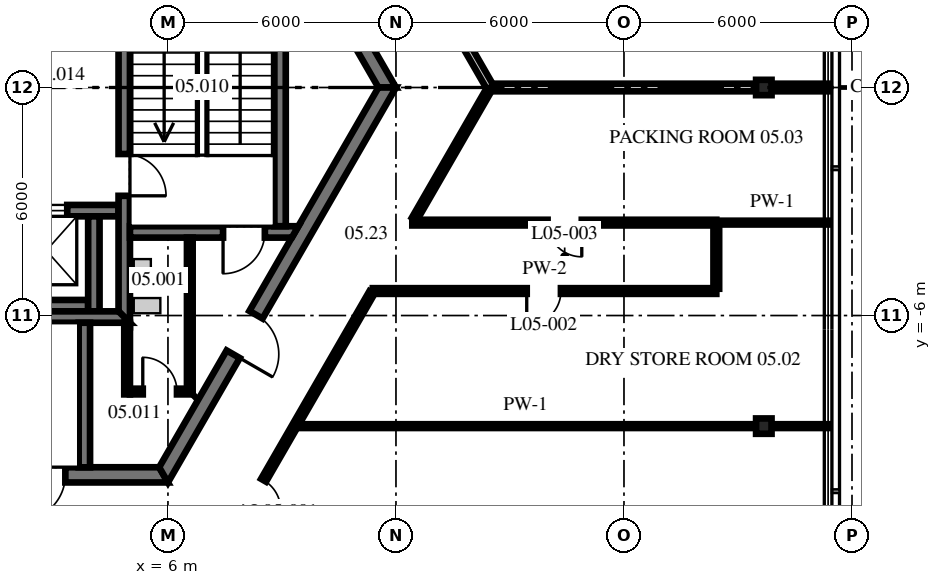
"""IFC4 building model, lengths in metres.
Left out: names, types, materials, properties, quantities, classifications, styles, units other than length and angle.
Written with IfcOpenShell. Run it as: python <this file> out.ifc"""

import sys

from ifc_helpers import new_model, si_unit, direction, frame, frame_2d, origin, origin_2d, place, context, subcontext, project, spatial, polyline, rectangle, i_section, outline, extrude, source, transform, mapped, element, fill, save


model = new_model("IFC4")
c1 = context("Model", 3, precision=1e-05, world=origin(), true_north=direction((0.0, 1.0)))
c2 = subcontext(c1, "Body", "Model", "MODEL_VIEW")
j1 = project(units=[si_unit("LENGTHUNIT", "METRE"), si_unit("PLANEANGLEUNIT", "RADIAN")], contexts=[c1])
p1 = place(None, origin())
s1 = spatial("IfcSite", under=j1, at=p1, CompositionType="ELEMENT")
p2 = place(p1, origin())
s2 = spatial("IfcBuilding", under=s1, at=p2, CompositionType="ELEMENT")
p3 = place(p2, frame((0.0, 0.0, 24.6)))
s3 = spatial("IfcBuildingStorey", under=s2, at=p3, CompositionType="ELEMENT", Elevation=24.6)
m1 = source(origin(), c2, "Body", "SweptSolid", [
    extrude(i_section(OverallWidth=0.404, OverallDepth=0.406, WebThickness=0.027, FlangeThickness=0.044, at=origin_2d()), origin(), (0.0, 0.0, 1.0), 4.3),
])
for number, where, z_axis, x_axis in (
    (1, (21.679, -8.91, 0.0), (0.0, 0.0, 1.0), (0.0, 1.0, 0.0)),
    (2, (21.679, 0.0, 0.0), (0.0, 0.0, 1.0), (0.0, 1.0, 0.0)),
):
    element("IfcColumn", number, at=place(p3, frame(where, z_axis=z_axis, x_axis=x_axis)), inside=s3, PredefinedType="COLUMN", context=c2, shape_type="MappedRepresentation", body=[
        mapped(m1, transform((0.0, 0.0, 0.0), scale=1.0)),
    ])
m2 = source(origin(), c2, "Body", "SweptSolid", [
    extrude(outline(polyline([(-0.115, -0.2), (11.885, -0.2), (11.654, 0.2), (0.115, 0.2), (-0.115, -0.2)])), origin(), (0.0, 0.0, 1.0), 4.1),
])
p4 = place(p3, frame((11.769, 0.0, 0.0), z_axis=(0.0, 0.0, 1.0), x_axis=(-0.499996592174, 0.866027371285, 0.0)))
e3 = element("IfcWall", 3, at=p4, inside=s3, PredefinedType="SHEAR", context=c2, shape_type="MappedRepresentation", body=[
    mapped(m2, transform((0.0, 0.0, 0.0), scale=1.0)),
])
p5 = place(p4, frame((5.75, 0.0, 0.0)))
e4 = element("IfcOpeningElement", 4, at=p5, cuts=e3, PredefinedType="OPENING", context=c2, shape_type="SweptSolid", body=[
    extrude(rectangle(XDim=1.2, YDim=2.1, at=frame_2d((0.6, 1.05))), frame((0.0, 0.21, 0.0), z_axis=(0.0, -1.0, 0.0), x_axis=(1.0, 0.0, 0.0)), (0.0, 0.0, 1.0), 0.42),
])
p6 = place(p3, frame((-5.885, -10.192, 0.0), z_axis=(0.0, 0.0, 1.0), x_axis=(1.0, 0.0, 0.0)))
e5 = element("IfcWall", 5, at=p6, inside=s3, PredefinedType="SHEAR", context=c2, shape_type="MappedRepresentation", body=[
    mapped(m2, transform((0.0, 0.0, 0.0), scale=1.0)),
])
p7 = place(p6, frame((7.985, 0.0, 0.0)))
e6 = element("IfcOpeningElement", 6, at=p7, cuts=e5, PredefinedType="OPENING", context=c2, shape_type="SweptSolid", body=[
    extrude(rectangle(XDim=1.2, YDim=2.1, at=frame_2d((0.6, 1.05))), frame((0.0, 0.21, 0.0), z_axis=(0.0, -1.0, 0.0), x_axis=(1.0, 0.0, 0.0)), (0.0, 0.0, 1.0), 0.42),
])
p8 = place(p6, frame((0.534, 0.0, 0.0)))
e7 = element("IfcOpeningElement", 7, at=p8, cuts=e5, PredefinedType="OPENING", context=c2, shape_type="SweptSolid", body=[
    extrude(rectangle(XDim=0.9, YDim=2.1, at=frame_2d((0.45, 1.05))), frame((0.0, 0.21, 0.0), z_axis=(0.0, -1.0, 0.0), x_axis=(1.0, 0.0, 0.0)), (0.0, 0.0, 1.0), 0.42),
])
p9 = place(p3, frame((5.885, -10.192, 0.0), z_axis=(0.0, 0.0, 1.0), x_axis=(0.499996592174, 0.866027371285, 0.0)))
e8 = element("IfcWall", 8, at=p9, inside=s3, PredefinedType="SHEAR", context=c2, shape_type="MappedRepresentation", body=[
    mapped(m2, transform((0.0, 0.0, 0.0), scale=1.0)),
])
p10 = place(p9, frame((3.665, 0.0, 0.0)))
e9 = element("IfcOpeningElement", 9, at=p10, cuts=e8, PredefinedType="OPENING", context=c2, shape_type="SweptSolid", body=[
    extrude(rectangle(XDim=1.2, YDim=2.1, at=frame_2d((0.6, 1.05))), frame((0.0, 0.21, 0.0), z_axis=(0.0, -1.0, 0.0), x_axis=(1.0, 0.0, 0.0)), (0.0, 0.0, 1.0), 0.42),
])
m3 = source(origin(), c2, "Body", "SweptSolid", [
    extrude(rectangle(XDim=12.8, YDim=0.3, at=frame_2d((6.4, 0.0))), origin(), (0.0, 0.0, 1.0), 4.1),
])
p11 = place(p3, frame((-8.1, -3.24, 0.0), z_axis=(0.0, 0.0, 1.0), x_axis=(1.0, 0.0, 0.0)))
e10 = element("IfcWall", 10, at=p11, inside=s3, PredefinedType="SHEAR", context=c2, shape_type="MappedRepresentation", body=[
    mapped(m3, transform((0.0, 0.0, 0.0), scale=1.0)),
])
p12 = place(p11, frame((2.212, 0.0, 0.0)))
e11 = element("IfcOpeningElement", 11, at=p12, cuts=e10, PredefinedType="OPENING", context=c2, shape_type="SweptSolid", body=[
    extrude(rectangle(XDim=0.9, YDim=2.1, at=frame_2d((0.45, 1.05))), frame((0.0, 0.16, 0.0), z_axis=(0.0, -1.0, 0.0), x_axis=(1.0, 0.0, 0.0)), (0.0, 0.0, 1.0), 0.32),
])
p13 = place(p11, frame((5.65, 0.0, 0.0)))
e12 = element("IfcOpeningElement", 12, at=p13, cuts=e10, PredefinedType="OPENING", context=c2, shape_type="SweptSolid", body=[
    extrude(rectangle(XDim=0.9, YDim=2.1, at=frame_2d((0.45, 1.05))), frame((0.0, 0.16, 0.0), z_axis=(0.0, -1.0, 0.0), x_axis=(1.0, 0.0, 0.0)), (0.0, 0.0, 1.0), 0.32),
])
p14 = place(p11, frame((7.887, 0.0, 0.0)))
e13 = element("IfcOpeningElement", 13, at=p14, cuts=e10, PredefinedType="OPENING", context=c2, shape_type="SweptSolid", body=[
    extrude(rectangle(XDim=0.9, YDim=2.1, at=frame_2d((0.45, 1.05))), frame((0.0, 0.16, 0.0), z_axis=(0.0, -1.0, 0.0), x_axis=(1.0, 0.0, 0.0)), (0.0, 0.0, 1.0), 0.32),
])
p15 = place(p11, frame((10.35, 0.0, 0.0)))
e14 = element("IfcOpeningElement", 14, at=p15, cuts=e10, PredefinedType="OPENING", context=c2, shape_type="SweptSolid", body=[
    extrude(rectangle(XDim=1.1, YDim=2.1, at=frame_2d((0.55, 1.05))), frame((0.0, 0.16, 0.0), z_axis=(0.0, -1.0, 0.0), x_axis=(1.0, 0.0, 0.0)), (0.0, 0.0, 1.0), 0.32),
])
m4 = source(origin(), c2, "Body", "SweptSolid", [
    extrude(outline(polyline([(12.0, -0.15), (-0.04, -0.15), (-0.213, 0.15), (12.0, 0.15), (12.0, -0.15)])), origin(), (0.0, 0.0, 1.0), 4.1),
])
p16 = place(p3, frame((-8.1, -5.74, 0.0), z_axis=(0.0, 0.0, 1.0), x_axis=(1.0, 0.0, 0.0)))
e15 = element("IfcWall", 15, at=p16, inside=s3, PredefinedType="SHEAR", context=c2, shape_type="MappedRepresentation", body=[
    mapped(m4, transform((0.0, 0.0, 0.0), scale=1.0)),
])
m5 = source(origin(), c2, "Body", "SweptSolid", [
    extrude(rectangle(XDim=2.5, YDim=0.3, at=frame_2d((1.25, 0.0))), origin(), (0.0, 0.0, 1.0), 4.1),
])
p17 = place(p3, frame((4.05, -5.89, 0.0), z_axis=(0.0, 0.0, 1.0), x_axis=(0.0, 1.0, 0.0)))
e16 = element("IfcWall", 16, at=p17, inside=s3, PredefinedType="SHEAR", context=c2, shape_type="MappedRepresentation", body=[
    mapped(m5, transform((0.0, 0.0, 0.0), scale=1.0)),
])
m6 = source(origin(), c2, "Body", "SweptSolid", [
    extrude(outline(polyline([(-0.15, -0.15), (9.99, -0.15), (9.99, 0.15), (0.15, 0.15), (-0.15, -0.15)])), origin(), (0.0, 0.0, 1.0), 4.1),
])
p18 = place(p3, frame((4.85, -6.04, 0.0), z_axis=(0.0, 0.0, 1.0), x_axis=(0.0, 1.0, 0.0)))
e17 = element("IfcWall", 17, at=p18, inside=s3, PredefinedType="SHEAR", context=c2, shape_type="MappedRepresentation", body=[
    mapped(m6, transform((0.0, 0.0, 0.0), scale=1.0)),
])
p19 = place(p18, frame((3.19, 0.0, 0.0)))
e18 = element("IfcOpeningElement", 18, at=p19, cuts=e17, PredefinedType="OPENING", context=c2, shape_type="SweptSolid", body=[
    extrude(rectangle(XDim=1.1, YDim=2.1, at=frame_2d((0.55, 1.05))), frame((0.0, 0.16, 0.0), z_axis=(0.0, -1.0, 0.0), x_axis=(1.0, 0.0, 0.0)), (0.0, 0.0, 1.0), 0.32),
])
m7 = source(origin(), c2, "Body", "SweptSolid", [
    extrude(outline(polyline([(0.0, -0.15), (0.0, 0.15), (4.433, 0.15), (4.26, -0.15), (0.0, -0.15)])), origin(), (0.0, 0.0, 1.0), 4.1),
])
p20 = place(p3, frame((5.0, -3.8, 0.0), z_axis=(0.0, 0.0, 1.0), x_axis=(1.0, 0.0, 0.0)))
e19 = element("IfcWall", 19, at=p20, inside=s3, PredefinedType="SHEAR", context=c2, shape_type="MappedRepresentation", body=[
    mapped(m7, transform((0.0, 0.0, 0.0), scale=1.0)),
])
p21 = place(p20, frame((2.45, 0.0, 0.0)))
e20 = element("IfcOpeningElement", 20, at=p21, cuts=e19, PredefinedType="OPENING", context=c2, shape_type="SweptSolid", body=[
    extrude(rectangle(XDim=1.1, YDim=2.1, at=frame_2d((0.55, 1.05))), frame((0.0, 0.16, 0.0), z_axis=(0.0, -1.0, 0.0), x_axis=(1.0, 0.0, 0.0)), (0.0, 0.0, 1.0), 0.32),
])
m8 = source(origin(), c2, "Body", "SweptSolid", [
    extrude(rectangle(XDim=7.3, YDim=0.3, at=frame_2d((3.65, 0.0))), origin(), (0.0, 0.0, 1.0), 4.1),
])
p22 = place(p3, frame((8.95, -3.65, 0.0), z_axis=(0.0, 0.0, 1.0), x_axis=(0.0, 1.0, 0.0)))
e21 = element("IfcWall", 21, at=p22, inside=s3, PredefinedType="SHEAR", context=c2, shape_type="MappedRepresentation", body=[
    mapped(m8, transform((0.0, 0.0, 0.0), scale=1.0)),
])
m9 = source(origin(), c2, "Body", "SweptSolid", [
    extrude(outline(polyline([(0.0, -0.15), (8.95, -0.15), (8.65, 0.15), (0.0, 0.15), (0.0, -0.15)])), origin(), (0.0, 0.0, 1.0), 4.1),
])
p23 = place(p3, frame((-3.95, -6.04, 0.0), z_axis=(0.0, 0.0, 1.0), x_axis=(1.0, 0.0, 0.0)))
e22 = element("IfcWall", 22, at=p23, inside=s3, PredefinedType="SHEAR", context=c2, shape_type="MappedRepresentation", body=[
    mapped(m9, transform((0.0, 0.0, 0.0), scale=1.0)),
])
m10 = source(origin(), c2, "Body", "SweptSolid", [
    extrude(outline(polyline([(3.8, -0.15), (-0.004, -0.15), (-0.004, 0.15), (3.8, 0.15), (3.8, -0.15)])), origin(), (0.0, 0.0, 1.0), 4.1),
])
p24 = place(p3, frame((3.8, -9.99, 0.0), z_axis=(0.0, 0.0, 1.0), x_axis=(0.0, 1.0, 0.0)))
e23 = element("IfcWall", 23, at=p24, inside=s3, PredefinedType="SHEAR", context=c2, shape_type="MappedRepresentation", body=[
    mapped(m10, transform((0.0, 0.0, 0.0), scale=1.0)),
])
m11 = source(origin(), c2, "Body", "SweptSolid", [
    extrude(outline(polyline([(0.0, -0.075), (1.65, -0.075), (1.5, 0.075), (0.0, 0.075), (0.0, -0.075)])), origin(), (0.0, 0.0, 1.0), 4.1),
])
p25 = place(p3, frame((5.0, -8.0, 0.0), z_axis=(0.0, 0.0, 1.0), x_axis=(1.0, 0.0, 0.0)))
e24 = element("IfcWall", 24, at=p25, inside=s3, PredefinedType="PARTITIONING", context=c2, shape_type="MappedRepresentation", body=[
    mapped(m11, transform((0.0, 0.0, 0.0), scale=1.0)),
])
p26 = place(p25, frame((0.337, 0.0, 0.0)))
e25 = element("IfcOpeningElement", 25, at=p26, cuts=e24, PredefinedType="OPENING", context=c2, shape_type="SweptSolid", body=[
    extrude(rectangle(XDim=0.9, YDim=2.1, at=frame_2d((0.45, 1.05))), frame((0.0, 0.085, 0.0), z_axis=(0.0, -1.0, 0.0), x_axis=(1.0, 0.0, 0.0)), (0.0, 0.0, 1.0), 0.17),
])
m12 = source(origin(), c2, "Body", "SweptSolid", [
    extrude(outline(polyline([(-0.075, -0.075), (4.05, -0.075), (4.05, 0.075), (0.075, 0.075), (-0.075, -0.075)])), origin(), (0.0, 0.0, 1.0), 4.1),
])
p27 = place(p3, frame((6.575, -8.0, 0.0), z_axis=(0.0, 0.0, 1.0), x_axis=(0.0, 1.0, 0.0)))
e26 = element("IfcWall", 26, at=p27, inside=s3, PredefinedType="PARTITIONING", context=c2, shape_type="MappedRepresentation", body=[
    mapped(m12, transform((0.0, 0.0, 0.0), scale=1.0)),
])
m13 = source(origin(), c2, "Body", "SweptSolid", [
    extrude(rectangle(XDim=1.885, YDim=0.15, at=frame_2d((0.942, 0.0))), origin(), (0.0, 0.0, 1.0), 4.1),
])
p28 = place(p3, frame((4.925, -8.075, 0.0), z_axis=(0.0, 0.0, 1.0), x_axis=(0.0, 1.0, 0.0)))
e27 = element("IfcWall", 27, at=p28, inside=s3, PredefinedType="PARTITIONING", context=c2, shape_type="MappedRepresentation", body=[
    mapped(m13, transform((0.0, 0.0, 0.0), scale=1.0)),
])
m14 = source(origin(), c2, "Body", "SweptSolid", [
    extrude(rectangle(XDim=8.229, YDim=0.2, at=frame_2d((4.115, 0.0))), origin(), (0.0, 0.0, 1.0), 4.1),
])
p29 = place(p3, frame((10.368, 7.127, 0.0), z_axis=(0.0, 0.0, 1.0), x_axis=(0.500012644715, -0.866018103232, 0.0)))
e28 = element("IfcWall", 28, at=p29, inside=s3, PredefinedType="PARTITIONING", context=c2, shape_type="MappedRepresentation", body=[
    mapped(m14, transform((0.0, 0.0, 0.0), scale=1.0)),
])
m15 = source(origin(), c2, "Body", "SweptSolid", [
    extrude(rectangle(XDim=12.148, YDim=0.1, at=frame_2d((6.074, 0.0))), origin(), (0.0, 0.0, 1.0), 3.343),
])
p30 = place(p3, frame((9.338, -8.91, 0.0), z_axis=(0.0, 0.0, 1.0), x_axis=(1.0, 0.0, 0.0)))
e29 = element("IfcWall", 29, at=p30, inside=s3, PredefinedType="PARTITIONING", context=c2, shape_type="MappedRepresentation", body=[
    mapped(m15, transform((0.0, 0.0, 0.0), scale=1.0)),
])
m16 = source(origin(), c2, "Body", "SweptSolid", [
    extrude(rectangle(XDim=1.499, YDim=0.1, at=frame_2d((0.749, 0.0))), origin(), (0.0, 0.0, 1.0), 4.1),
])
p31 = place(p3, frame((21.873, -8.91, 0.0), z_axis=(0.0, 0.0, 1.0), x_axis=(1.0, 0.0, 0.0)))
e30 = element("IfcWall", 30, at=p31, inside=s3, PredefinedType="PARTITIONING", context=c2, shape_type="MappedRepresentation", body=[
    mapped(m16, transform((0.0, 0.0, 0.0), scale=1.0)),
])
m17 = source(origin(), c2, "Body", "SweptSolid", [
    extrude(rectangle(XDim=9.039, YDim=0.15, at=frame_2d((4.519, 0.0))), origin(), (0.0, 0.0, 1.0), 4.1),
])
p32 = place(p3, frame((11.391, -5.355, 0.0), z_axis=(0.0, 0.0, 1.0), x_axis=(1.0, 0.0, 0.0)))
e31 = element("IfcWall", 31, at=p32, inside=s3, PredefinedType="PARTITIONING", context=c2, shape_type="MappedRepresentation", body=[
    mapped(m17, transform((0.0, 0.0, 0.0), scale=1.0)),
])
p33 = place(p32, frame((4.05, 0.0, 0.0)))
e32 = element("IfcOpeningElement", 32, at=p33, cuts=e31, PredefinedType="OPENING", context=c2, shape_type="SweptSolid", body=[
    extrude(rectangle(XDim=0.9, YDim=2.1, at=frame_2d((0.45, 1.05))), frame((0.0, 0.085, 0.0), z_axis=(0.0, -1.0, 0.0), x_axis=(1.0, 0.0, 0.0)), (0.0, 0.0, 1.0), 0.17),
])
m18 = source(origin(), c2, "Body", "SweptSolid", [
    extrude(rectangle(XDim=7.999, YDim=0.15, at=frame_2d((4.0, 0.0))), origin(), (0.0, 0.0, 1.0), 4.1),
])
p34 = place(p3, frame((12.43, -3.555, 0.0), z_axis=(0.0, 0.0, 1.0), x_axis=(1.0, 0.0, 0.0)))
e33 = element("IfcWall", 33, at=p34, inside=s3, PredefinedType="PARTITIONING", context=c2, shape_type="MappedRepresentation", body=[
    mapped(m18, transform((0.0, 0.0, 0.0), scale=1.0)),
])
p35 = place(p34, frame((3.559, 0.0, 0.0)))
e34 = element("IfcOpeningElement", 34, at=p35, cuts=e33, PredefinedType="OPENING", context=c2, shape_type="SweptSolid", body=[
    extrude(rectangle(XDim=0.9, YDim=2.1, at=frame_2d((0.45, 1.05))), frame((0.0, 0.085, 0.0), z_axis=(0.0, -1.0, 0.0), x_axis=(1.0, 0.0, 0.0)), (0.0, 0.0, 1.0), 0.17),
])
m19 = source(origin(), c2, "Body", "SweptSolid", [
    extrude(rectangle(XDim=2.942, YDim=0.1, at=frame_2d((1.471, 0.0))), origin(), (0.0, 0.0, 1.0), 4.1),
])
p36 = place(p3, frame((20.429, -3.555, 0.0), z_axis=(0.0, 0.0, 1.0), x_axis=(1.0, 0.0, 0.0)))
e35 = element("IfcWall", 35, at=p36, inside=s3, PredefinedType="PARTITIONING", context=c2, shape_type="MappedRepresentation", body=[
    mapped(m19, transform((0.0, 0.0, 0.0), scale=1.0)),
])
m20 = source(origin(), c2, "Body", "SweptSolid", [
    extrude(rectangle(XDim=6.934, YDim=0.2, at=frame_2d((3.467, 0.0))), origin(), (0.0, 0.0, 1.0), 3.488),
])
p37 = place(p3, frame((14.552, 0.0, 0.0), z_axis=(0.0, 0.0, 1.0), x_axis=(1.0, 0.0, 0.0)))
e36 = element("IfcWall", 36, at=p37, inside=s3, PredefinedType="PARTITIONING", context=c2, shape_type="MappedRepresentation", body=[
    mapped(m20, transform((0.0, 0.0, 0.0), scale=1.0)),
])
m21 = source(origin(), c2, "Body", "SweptSolid", [
    extrude(rectangle(XDim=1.499, YDim=0.2, at=frame_2d((0.749, 0.0))), origin(), (0.0, 0.0, 1.0), 4.1),
])
p38 = place(p3, frame((21.873, 0.0, 0.0), z_axis=(0.0, 0.0, 1.0), x_axis=(1.0, 0.0, 0.0)))
e37 = element("IfcWall", 37, at=p38, inside=s3, PredefinedType="PARTITIONING", context=c2, shape_type="MappedRepresentation", body=[
    mapped(m21, transform((0.0, 0.0, 0.0), scale=1.0)),
])
m22 = source(origin(), c2, "Body", "SweptSolid", [
    extrude(rectangle(XDim=8.219, YDim=0.15, at=frame_2d((4.11, 0.0))), origin(), (0.0, 0.0, 1.0), 4.1),
])
p39 = place(p3, frame((7.256, -12.516, 0.0), z_axis=(0.0, 0.0, 1.0), x_axis=(0.499994999852, 0.866028290602, 0.0)))
e38 = element("IfcWall", 38, at=p39, inside=s3, PredefinedType="PARTITIONING", context=c2, shape_type="MappedRepresentation", body=[
    mapped(m22, transform((0.0, 0.0, 0.0), scale=1.0)),
])
p40 = place(p39, frame((1.62, 0.0, 0.0)))
e39 = element("IfcOpeningElement", 39, at=p40, cuts=e38, PredefinedType="OPENING", context=c2, shape_type="SweptSolid", body=[
    extrude(rectangle(XDim=0.9, YDim=2.1, at=frame_2d((0.45, 1.05))), frame((0.0, 0.085, 0.0), z_axis=(0.0, -1.0, 0.0), x_axis=(1.0, 0.0, 0.0)), (0.0, 0.0, 1.0), 0.17),
])
m23 = source(origin(), c2, "Body", "SweptSolid", [
    extrude(rectangle(XDim=3.925, YDim=0.15, at=frame_2d((1.962, 0.0))), origin(), (0.0, 0.0, 1.0), 4.1),
])
p41 = place(p3, frame((12.485, -3.46, 0.0), z_axis=(0.0, 0.0, 1.0), x_axis=(0.499979109433, 0.866037464623, 0.0)))
e40 = element("IfcWall", 40, at=p41, inside=s3, PredefinedType="PARTITIONING", context=c2, shape_type="MappedRepresentation", body=[
    mapped(m23, transform((0.0, 0.0, 0.0), scale=1.0)),
])
m24 = source(origin(), c2, "Body", "SweptSolid", [
    extrude(rectangle(XDim=1.68, YDim=0.15, at=frame_2d((0.84, 0.0))), origin(), (0.0, 0.0, 1.0), 4.1),
])
p42 = place(p3, frame((20.429, -5.295, 0.0), z_axis=(0.0, 0.0, 1.0), x_axis=(0.0, 1.0, 0.0)))
e41 = element("IfcWall", 41, at=p42, inside=s3, PredefinedType="PARTITIONING", context=c2, shape_type="MappedRepresentation", body=[
    mapped(m24, transform((0.0, 0.0, 0.0), scale=1.0)),
])
p43 = place(p7, frame((1.2, 0.0, 0.0), z_axis=(0.0, 0.0, 1.0), x_axis=(-1.0, 0.0, 0.0)))
e42 = element("IfcDoor", 42, at=p43, inside=s3, OperationType="SINGLE_SWING_RIGHT", PredefinedType="DOOR", context=c2, shape_type="SweptSolid", body=[
    extrude(rectangle(XDim=1.2, YDim=2.1, at=frame_2d((0.6, 1.05))), frame((0.0, 0.025, 0.0), z_axis=(0.0, -1.0, 0.0), x_axis=(1.0, 0.0, 0.0)), (0.0, 0.0, 1.0), 0.05),
])
fill(e6, e42)
p44 = place(p10, frame((1.2, 0.0, 0.0), z_axis=(0.0, 0.0, 1.0), x_axis=(-1.0, 0.0, 0.0)))
e43 = element("IfcDoor", 43, at=p44, inside=s3, OperationType="SINGLE_SWING_RIGHT", PredefinedType="DOOR", context=c2, shape_type="SweptSolid", body=[
    extrude(rectangle(XDim=1.2, YDim=2.1, at=frame_2d((0.6, 1.05))), frame((0.0, 0.025, 0.0), z_axis=(0.0, -1.0, 0.0), x_axis=(1.0, 0.0, 0.0)), (0.0, 0.0, 1.0), 0.05),
])
fill(e9, e43)
p45 = place(p19, frame((1.1, 0.0, 0.0), z_axis=(0.0, 0.0, 1.0), x_axis=(-1.0, 0.0, 0.0)))
e44 = element("IfcDoor", 44, at=p45, inside=s3, OperationType="SINGLE_SWING_RIGHT", PredefinedType="DOOR", context=c2, shape_type="SweptSolid", body=[
    extrude(rectangle(XDim=1.1, YDim=2.1, at=frame_2d((0.55, 1.05))), frame((0.0, 0.025, 0.0), z_axis=(0.0, -1.0, 0.0), x_axis=(1.0, 0.0, 0.0)), (0.0, 0.0, 1.0), 0.05),
])
fill(e18, e44)
p46 = place(p21, frame((1.1, 0.0, 0.0), z_axis=(0.0, 0.0, 1.0), x_axis=(-1.0, 0.0, 0.0)))
e45 = element("IfcDoor", 45, at=p46, inside=s3, OperationType="SINGLE_SWING_RIGHT", PredefinedType="DOOR", context=c2, shape_type="SweptSolid", body=[
    extrude(rectangle(XDim=1.1, YDim=2.1, at=frame_2d((0.55, 1.05))), frame((0.0, 0.025, 0.0), z_axis=(0.0, -1.0, 0.0), x_axis=(1.0, 0.0, 0.0)), (0.0, 0.0, 1.0), 0.05),
])
fill(e20, e45)
p47 = place(p26, origin())
e46 = element("IfcDoor", 46, at=p47, inside=s3, OperationType="SINGLE_SWING_LEFT", PredefinedType="DOOR", context=c2, shape_type="SweptSolid", body=[
    extrude(rectangle(XDim=0.9, YDim=2.1, at=frame_2d((0.45, 1.05))), frame((0.0, 0.025, 0.0), z_axis=(0.0, -1.0, 0.0), x_axis=(1.0, 0.0, 0.0)), (0.0, 0.0, 1.0), 0.05),
])
fill(e25, e46)
p48 = place(p15, origin())
e47 = element("IfcDoor", 47, at=p48, inside=s3, OperationType="DOUBLE_DOOR_SLIDING", PredefinedType="DOOR", context=c2, shape_type="SweptSolid", body=[
    extrude(rectangle(XDim=1.1, YDim=2.1, at=frame_2d((0.55, 1.05))), frame((0.0, 0.025, 0.0), z_axis=(0.0, -1.0, 0.0), x_axis=(1.0, 0.0, 0.0)), (0.0, 0.0, 1.0), 0.05),
])
fill(e14, e47)
p49 = place(p40, origin())
e48 = element("IfcDoor", 48, at=p49, inside=s3, OperationType="SINGLE_SWING_RIGHT", PredefinedType="DOOR", context=c2, shape_type="SweptSolid", body=[
    extrude(rectangle(XDim=0.9, YDim=2.1, at=frame_2d((0.45, 1.05))), frame((0.0, 0.025, 0.0), z_axis=(0.0, -1.0, 0.0), x_axis=(1.0, 0.0, 0.0)), (0.0, 0.0, 1.0), 0.05),
])
fill(e39, e48)
p50 = place(p33, origin())
e49 = element("IfcDoor", 49, at=p50, inside=s3, OperationType="SINGLE_SWING_RIGHT", PredefinedType="DOOR", context=c2, shape_type="SweptSolid", body=[
    extrude(rectangle(XDim=0.9, YDim=2.1, at=frame_2d((0.45, 1.05))), frame((0.0, 0.025, 0.0), z_axis=(0.0, -1.0, 0.0), x_axis=(1.0, 0.0, 0.0)), (0.0, 0.0, 1.0), 0.05),
])
fill(e32, e49)
p51 = place(p35, origin())
e50 = element("IfcDoor", 50, at=p51, inside=s3, OperationType="SINGLE_SWING_RIGHT", PredefinedType="DOOR", context=c2, shape_type="SweptSolid", body=[
    extrude(rectangle(XDim=0.9, YDim=2.1, at=frame_2d((0.45, 1.05))), frame((0.0, 0.025, 0.0), z_axis=(0.0, -1.0, 0.0), x_axis=(1.0, 0.0, 0.0)), (0.0, 0.0, 1.0), 0.05),
])
fill(e34, e50)
save(model, sys.argv[1])
